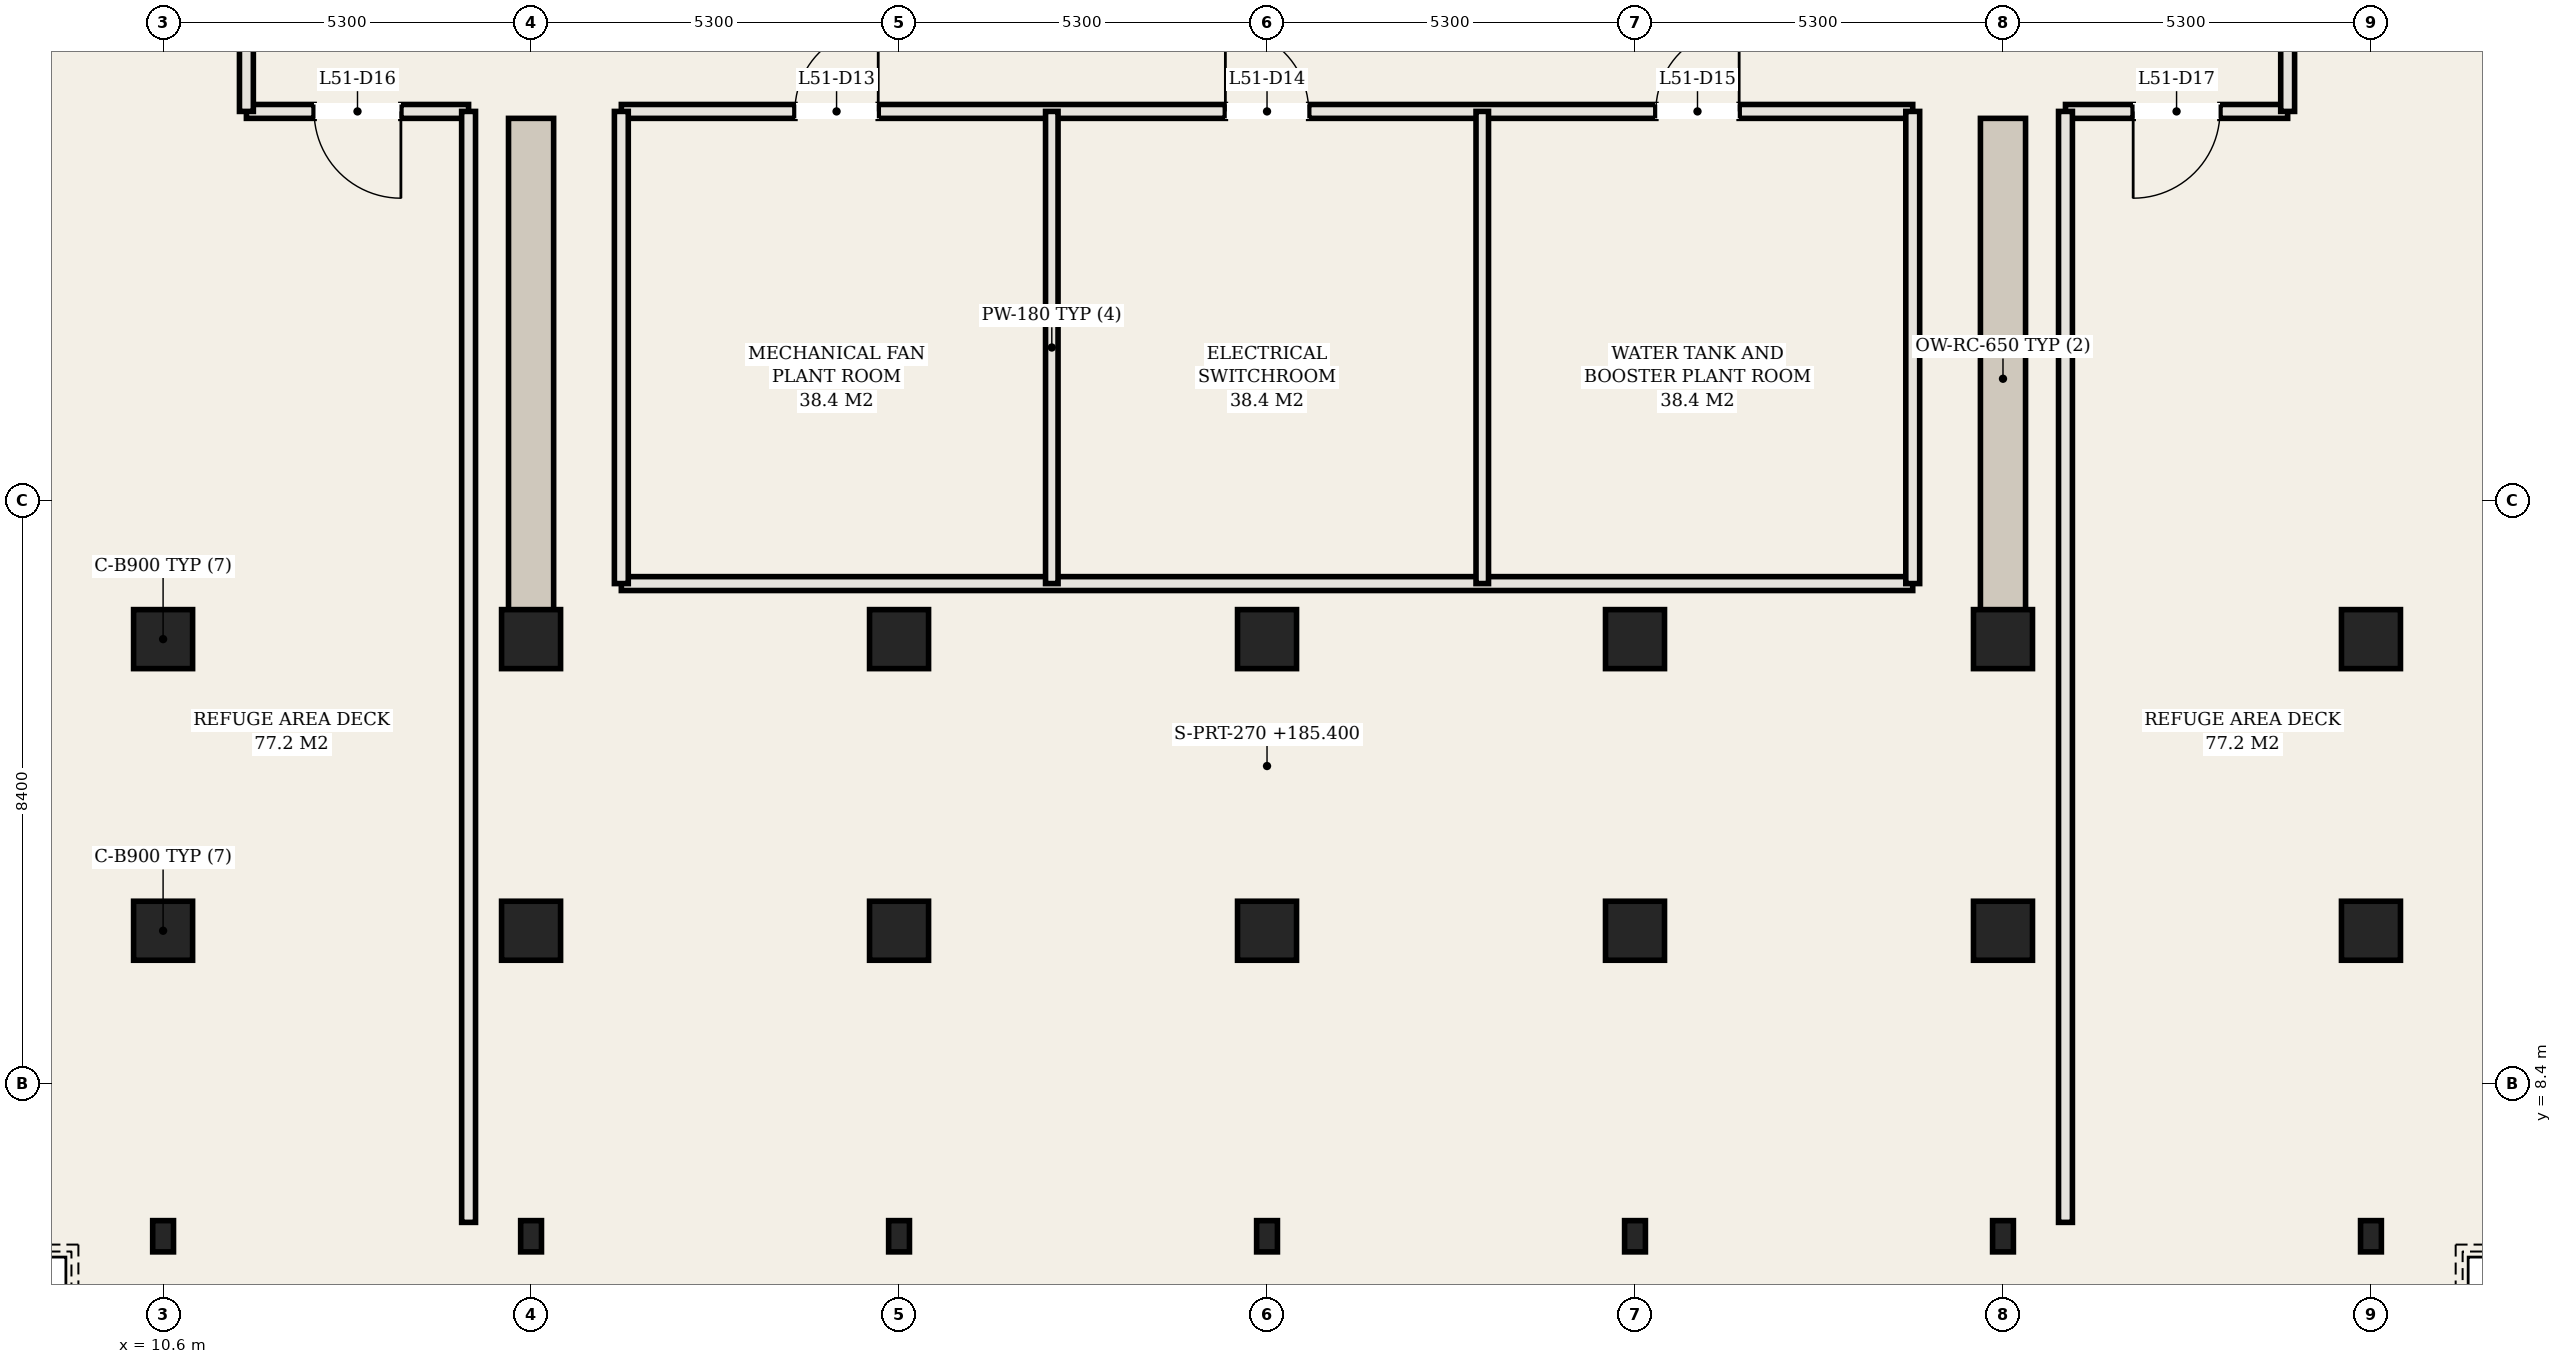
"""IFC4 building model, lengths in metres.
Left out: names, types, materials, properties, quantities, classifications, styles, units other than length and angle.
Written with IfcOpenShell. Run it as: python <this file> out.ifc"""

import sys

from ifc_helpers import new_model, si_unit, direction, frame, frame_2d, origin, origin_2d, place, context, subcontext, project, spatial, rectangle, hollow_rectangle, extrude, element, fill, save


model = new_model("IFC4")
c1 = context("Model", 3, precision=1e-05, world=origin(), true_north=direction((0.0, 1.0)))
c2 = subcontext(c1, "Body", "Model", "MODEL_VIEW")
j1 = project(units=[si_unit("LENGTHUNIT", "METRE"), si_unit("PLANEANGLEUNIT", "RADIAN")], contexts=[c1])
p1 = place(None, origin())
s1 = spatial("IfcSite", under=j1, at=p1, CompositionType="ELEMENT")
p2 = place(p1, origin())
s2 = spatial("IfcBuilding", under=s1, at=p2, CompositionType="ELEMENT")
p3 = place(p2, frame((0.0, 0.0, 185.4)))
s3 = spatial("IfcBuildingStorey", under=s2, at=p3, CompositionType="ELEMENT", Elevation=185.4)
for number, where, z_axis, x_axis in (
    (1, (15.9, 14.8, 0.0), (0.0, 0.0, 1.0), (0.0, 1.0, 0.0)),
    (2, (37.1, 14.8, 0.0), (0.0, 0.0, 1.0), (0.0, 1.0, 0.0)),
):
    element("IfcWall", number, at=place(p3, frame(where, z_axis=z_axis, x_axis=x_axis)), inside=s3, PredefinedType="SHEAR", context=c2, shape_type="SweptSolid", body=[
        extrude(rectangle(XDim=7.5, YDim=0.65, at=frame_2d((3.75, 0.0))), origin(), (0.0, 0.0, 1.0), 6.56),
    ])
for number, where, z_axis, x_axis in (
    (3, (10.6, 14.8, 0.0), (0.0, 0.0, 1.0), (1.0, 0.0, 0.0)),
    (4, (10.6, 10.6, 0.0), (0.0, 0.0, 1.0), (1.0, 0.0, 0.0)),
    (5, (15.9, 14.8, 0.0), (0.0, 0.0, 1.0), (1.0, 0.0, 0.0)),
    (6, (15.9, 10.6, 0.0), (0.0, 0.0, 1.0), (1.0, 0.0, 0.0)),
    (7, (21.2, 14.8, 0.0), (0.0, 0.0, 1.0), (1.0, 0.0, 0.0)),
    (8, (21.2, 10.6, 0.0), (0.0, 0.0, 1.0), (1.0, 0.0, 0.0)),
    (9, (26.5, 14.8, 0.0), (0.0, 0.0, 1.0), (1.0, 0.0, 0.0)),
    (10, (26.5, 10.6, 0.0), (0.0, 0.0, 1.0), (1.0, 0.0, 0.0)),
    (11, (31.8, 14.8, 0.0), (0.0, 0.0, 1.0), (1.0, 0.0, 0.0)),
    (12, (31.8, 10.6, 0.0), (0.0, 0.0, 1.0), (1.0, 0.0, 0.0)),
    (13, (37.1, 14.8, 0.0), (0.0, 0.0, 1.0), (1.0, 0.0, 0.0)),
    (14, (37.1, 10.6, 0.0), (0.0, 0.0, 1.0), (1.0, 0.0, 0.0)),
    (15, (42.4, 14.8, 0.0), (0.0, 0.0, 1.0), (1.0, 0.0, 0.0)),
    (16, (42.4, 10.6, 0.0), (0.0, 0.0, 1.0), (1.0, 0.0, 0.0)),
):
    element("IfcColumn", number, at=place(p3, frame(where, z_axis=z_axis, x_axis=x_axis)), inside=s3, PredefinedType="COLUMN", context=c2, shape_type="SweptSolid", body=[
        extrude(hollow_rectangle(XDim=0.85, YDim=0.85, WallThickness=0.028, at=origin_2d()), origin(), (0.0, 0.0, 1.0), 6.8),
    ])
p4 = place(p3, frame((10.6, 6.2, 0.0), z_axis=(0.0, 0.0, 1.0), x_axis=(1.0, 0.0, 0.0)))
e17 = element("IfcColumn", 17, at=p4, inside=s3, PredefinedType="COLUMN", context=c2, shape_type="SweptSolid", body=[
    extrude(hollow_rectangle(XDim=0.3, YDim=0.45, WallThickness=0.016, at=origin_2d()), origin(), (0.0, 0.0, 1.0), 6.764),
])
for number, where, z_axis, x_axis in (
    (18, (15.9, 6.2, 0.0), (0.0, 0.0, 1.0), (1.0, 0.0, 0.0)),
    (19, (21.2, 6.2, 0.0), (0.0, 0.0, 1.0), (1.0, 0.0, 0.0)),
    (20, (26.5, 6.2, 0.0), (0.0, 0.0, 1.0), (1.0, 0.0, 0.0)),
    (21, (31.8, 6.2, 0.0), (0.0, 0.0, 1.0), (1.0, 0.0, 0.0)),
    (22, (37.1, 6.2, 0.0), (0.0, 0.0, 1.0), (1.0, 0.0, 0.0)),
):
    element("IfcColumn", number, at=place(p3, frame(where, z_axis=z_axis, x_axis=x_axis)), inside=s3, PredefinedType="COLUMN", context=c2, shape_type="SweptSolid", body=[
        extrude(hollow_rectangle(XDim=0.3, YDim=0.45, WallThickness=0.016, at=origin_2d()), origin(), (0.0, 0.0, 1.0), 6.8),
    ])
p5 = place(p3, frame((42.4, 6.2, 0.0), z_axis=(0.0, 0.0, 1.0), x_axis=(1.0, 0.0, 0.0)))
e23 = element("IfcColumn", 23, at=p5, inside=s3, PredefinedType="COLUMN", context=c2, shape_type="SweptSolid", body=[
    extrude(hollow_rectangle(XDim=0.3, YDim=0.45, WallThickness=0.016, at=origin_2d()), origin(), (0.0, 0.0, 1.0), 6.764),
])
p6 = place(p3, frame((17.2, 22.4, 0.0), z_axis=(0.0, 0.0, 1.0), x_axis=(1.0, 0.0, 0.0)))
e24 = element("IfcWall", 24, at=p6, inside=s3, PredefinedType="PARTITIONING", context=c2, shape_type="SweptSolid", body=[
    extrude(rectangle(XDim=18.6, YDim=0.2, at=frame_2d((9.3, 0.0))), origin(), (0.0, 0.0, 1.0), 6.56),
])
p7 = place(p6, frame((2.5, 0.0, 0.0)))
e25 = element("IfcOpeningElement", 25, at=p7, cuts=e24, PredefinedType="OPENING", context=c2, shape_type="SweptSolid", body=[
    extrude(rectangle(XDim=1.2, YDim=2.2, at=frame_2d((0.6, 1.1))), frame((0.0, 0.11, 0.0), z_axis=(0.0, -1.0, 0.0), x_axis=(1.0, 0.0, 0.0)), (0.0, 0.0, 1.0), 0.22),
])
p8 = place(p6, frame((8.7, 0.0, 0.0)))
e26 = element("IfcOpeningElement", 26, at=p8, cuts=e24, PredefinedType="OPENING", context=c2, shape_type="SweptSolid", body=[
    extrude(rectangle(XDim=1.2, YDim=2.2, at=frame_2d((0.6, 1.1))), frame((0.0, 0.11, 0.0), z_axis=(0.0, -1.0, 0.0), x_axis=(1.0, 0.0, 0.0)), (0.0, 0.0, 1.0), 0.22),
])
p9 = place(p6, frame((14.9, 0.0, 0.0)))
e27 = element("IfcOpeningElement", 27, at=p9, cuts=e24, PredefinedType="OPENING", context=c2, shape_type="SweptSolid", body=[
    extrude(rectangle(XDim=1.2, YDim=2.2, at=frame_2d((0.6, 1.1))), frame((0.0, 0.11, 0.0), z_axis=(0.0, -1.0, 0.0), x_axis=(1.0, 0.0, 0.0)), (0.0, 0.0, 1.0), 0.22),
])
p10 = place(p3, frame((17.2, 15.6, 0.0), z_axis=(0.0, 0.0, 1.0), x_axis=(1.0, 0.0, 0.0)))
e28 = element("IfcWall", 28, at=p10, inside=s3, PredefinedType="PARTITIONING", context=c2, shape_type="SweptSolid", body=[
    extrude(rectangle(XDim=18.6, YDim=0.2, at=frame_2d((9.3, 0.0))), origin(), (0.0, 0.0, 1.0), 6.56),
])
for number, where, z_axis, x_axis in (
    (29, (17.2, 15.6, 0.0), (0.0, 0.0, 1.0), (0.0, 1.0, 0.0)),
    (30, (35.8, 15.6, 0.0), (0.0, 0.0, 1.0), (0.0, 1.0, 0.0)),
):
    element("IfcWall", number, at=place(p3, frame(where, z_axis=z_axis, x_axis=x_axis)), inside=s3, PredefinedType="PARTITIONING", context=c2, shape_type="SweptSolid", body=[
        extrude(rectangle(XDim=6.8, YDim=0.2, at=frame_2d((3.4, 0.0))), origin(), (0.0, 0.0, 1.0), 6.56),
    ])
for number, where, z_axis, x_axis in (
    (31, (23.4, 15.6, 0.0), (0.0, 0.0, 1.0), (0.0, 1.0, 0.0)),
    (32, (29.6, 15.6, 0.0), (0.0, 0.0, 1.0), (0.0, 1.0, 0.0)),
):
    element("IfcWall", number, at=place(p3, frame(where, z_axis=z_axis, x_axis=x_axis)), inside=s3, PredefinedType="PARTITIONING", context=c2, shape_type="SweptSolid", body=[
        extrude(rectangle(XDim=6.8, YDim=0.18, at=frame_2d((3.4, 0.0))), origin(), (0.0, 0.0, 1.0), 6.56),
    ])
p11 = place(p3, frame((11.8, 22.4, 0.0), z_axis=(0.0, 0.0, 1.0), x_axis=(1.0, 0.0, 0.0)))
e33 = element("IfcWall", 33, at=p11, inside=s3, PredefinedType="PARTITIONING", context=c2, shape_type="SweptSolid", body=[
    extrude(rectangle(XDim=3.2, YDim=0.2, at=frame_2d((1.6, 0.0))), origin(), (0.0, 0.0, 1.0), 6.56),
])
p12 = place(p11, frame((0.975, 0.0, 0.0)))
e34 = element("IfcOpeningElement", 34, at=p12, cuts=e33, PredefinedType="OPENING", context=c2, shape_type="SweptSolid", body=[
    extrude(rectangle(XDim=1.25, YDim=2.2, at=frame_2d((0.625, 1.1))), frame((0.0, 0.11, 0.0), z_axis=(0.0, -1.0, 0.0), x_axis=(1.0, 0.0, 0.0)), (0.0, 0.0, 1.0), 0.22),
])
p13 = place(p3, frame((38.0, 22.4, 0.0), z_axis=(0.0, 0.0, 1.0), x_axis=(1.0, 0.0, 0.0)))
e35 = element("IfcWall", 35, at=p13, inside=s3, PredefinedType="PARTITIONING", context=c2, shape_type="SweptSolid", body=[
    extrude(rectangle(XDim=3.2, YDim=0.2, at=frame_2d((1.6, 0.0))), origin(), (0.0, 0.0, 1.0), 6.56),
])
p14 = place(p13, frame((0.975, 0.0, 0.0)))
e36 = element("IfcOpeningElement", 36, at=p14, cuts=e35, PredefinedType="OPENING", context=c2, shape_type="SweptSolid", body=[
    extrude(rectangle(XDim=1.25, YDim=2.2, at=frame_2d((0.625, 1.1))), frame((0.0, 0.11, 0.0), z_axis=(0.0, -1.0, 0.0), x_axis=(1.0, 0.0, 0.0)), (0.0, 0.0, 1.0), 0.22),
])
for number, where, z_axis, x_axis in (
    (37, (11.8, 22.4, 0.0), (0.0, 0.0, 1.0), (0.0, 1.0, 0.0)),
    (38, (41.2, 22.4, 0.0), (0.0, 0.0, 1.0), (0.0, 1.0, 0.0)),
):
    element("IfcWall", number, at=place(p3, frame(where, z_axis=z_axis, x_axis=x_axis)), inside=s3, PredefinedType="PARTITIONING", context=c2, shape_type="SweptSolid", body=[
        extrude(rectangle(XDim=2.75, YDim=0.2, at=frame_2d((1.375, 0.0))), origin(), (0.0, 0.0, 1.0), 6.56),
    ])
for number, where, z_axis, x_axis in (
    (39, (15.0, 6.4, 0.0), (0.0, 0.0, 1.0), (0.0, 1.0, 0.0)),
    (40, (38.0, 6.4, 0.0), (0.0, 0.0, 1.0), (0.0, 1.0, 0.0)),
):
    element("IfcWall", number, at=place(p3, frame(where, z_axis=z_axis, x_axis=x_axis)), inside=s3, PredefinedType="PARTITIONING", context=c2, shape_type="SweptSolid", body=[
        extrude(rectangle(XDim=16.0, YDim=0.2, at=frame_2d((8.0, 0.0))), origin(), (0.0, 0.0, 1.0), 6.56),
    ])
p15 = place(p7, origin())
e41 = element("IfcDoor", 41, at=p15, inside=s3, OperationType="SINGLE_SWING_RIGHT", PredefinedType="DOOR", context=c2, shape_type="SweptSolid", body=[
    extrude(rectangle(XDim=1.2, YDim=2.2, at=frame_2d((0.6, 1.1))), frame((0.0, 0.025, 0.0), z_axis=(0.0, -1.0, 0.0), x_axis=(1.0, 0.0, 0.0)), (0.0, 0.0, 1.0), 0.05),
])
fill(e25, e41)
p16 = place(p8, origin())
e42 = element("IfcDoor", 42, at=p16, inside=s3, OperationType="SINGLE_SWING_LEFT", PredefinedType="DOOR", context=c2, shape_type="SweptSolid", body=[
    extrude(rectangle(XDim=1.2, YDim=2.2, at=frame_2d((0.6, 1.1))), frame((0.0, 0.025, 0.0), z_axis=(0.0, -1.0, 0.0), x_axis=(1.0, 0.0, 0.0)), (0.0, 0.0, 1.0), 0.05),
])
fill(e26, e42)
p17 = place(p9, origin())
e43 = element("IfcDoor", 43, at=p17, inside=s3, OperationType="SINGLE_SWING_RIGHT", PredefinedType="DOOR", context=c2, shape_type="SweptSolid", body=[
    extrude(rectangle(XDim=1.2, YDim=2.2, at=frame_2d((0.6, 1.1))), frame((0.0, 0.025, 0.0), z_axis=(0.0, -1.0, 0.0), x_axis=(1.0, 0.0, 0.0)), (0.0, 0.0, 1.0), 0.05),
])
fill(e27, e43)
p18 = place(p12, frame((1.25, 0.0, 0.0), z_axis=(0.0, 0.0, 1.0), x_axis=(-1.0, 0.0, 0.0)))
e44 = element("IfcDoor", 44, at=p18, inside=s3, OperationType="SINGLE_SWING_LEFT", PredefinedType="DOOR", context=c2, shape_type="SweptSolid", body=[
    extrude(rectangle(XDim=1.25, YDim=2.2, at=frame_2d((0.625, 1.1))), frame((0.0, 0.025, 0.0), z_axis=(0.0, -1.0, 0.0), x_axis=(1.0, 0.0, 0.0)), (0.0, 0.0, 1.0), 0.05),
])
fill(e34, e44)
p19 = place(p14, frame((1.25, 0.0, 0.0), z_axis=(0.0, 0.0, 1.0), x_axis=(-1.0, 0.0, 0.0)))
e45 = element("IfcDoor", 45, at=p19, inside=s3, OperationType="SINGLE_SWING_RIGHT", PredefinedType="DOOR", context=c2, shape_type="SweptSolid", body=[
    extrude(rectangle(XDim=1.25, YDim=2.2, at=frame_2d((0.625, 1.1))), frame((0.0, 0.025, 0.0), z_axis=(0.0, -1.0, 0.0), x_axis=(1.0, 0.0, 0.0)), (0.0, 0.0, 1.0), 0.05),
])
fill(e36, e45)
save(model, sys.argv[1])
